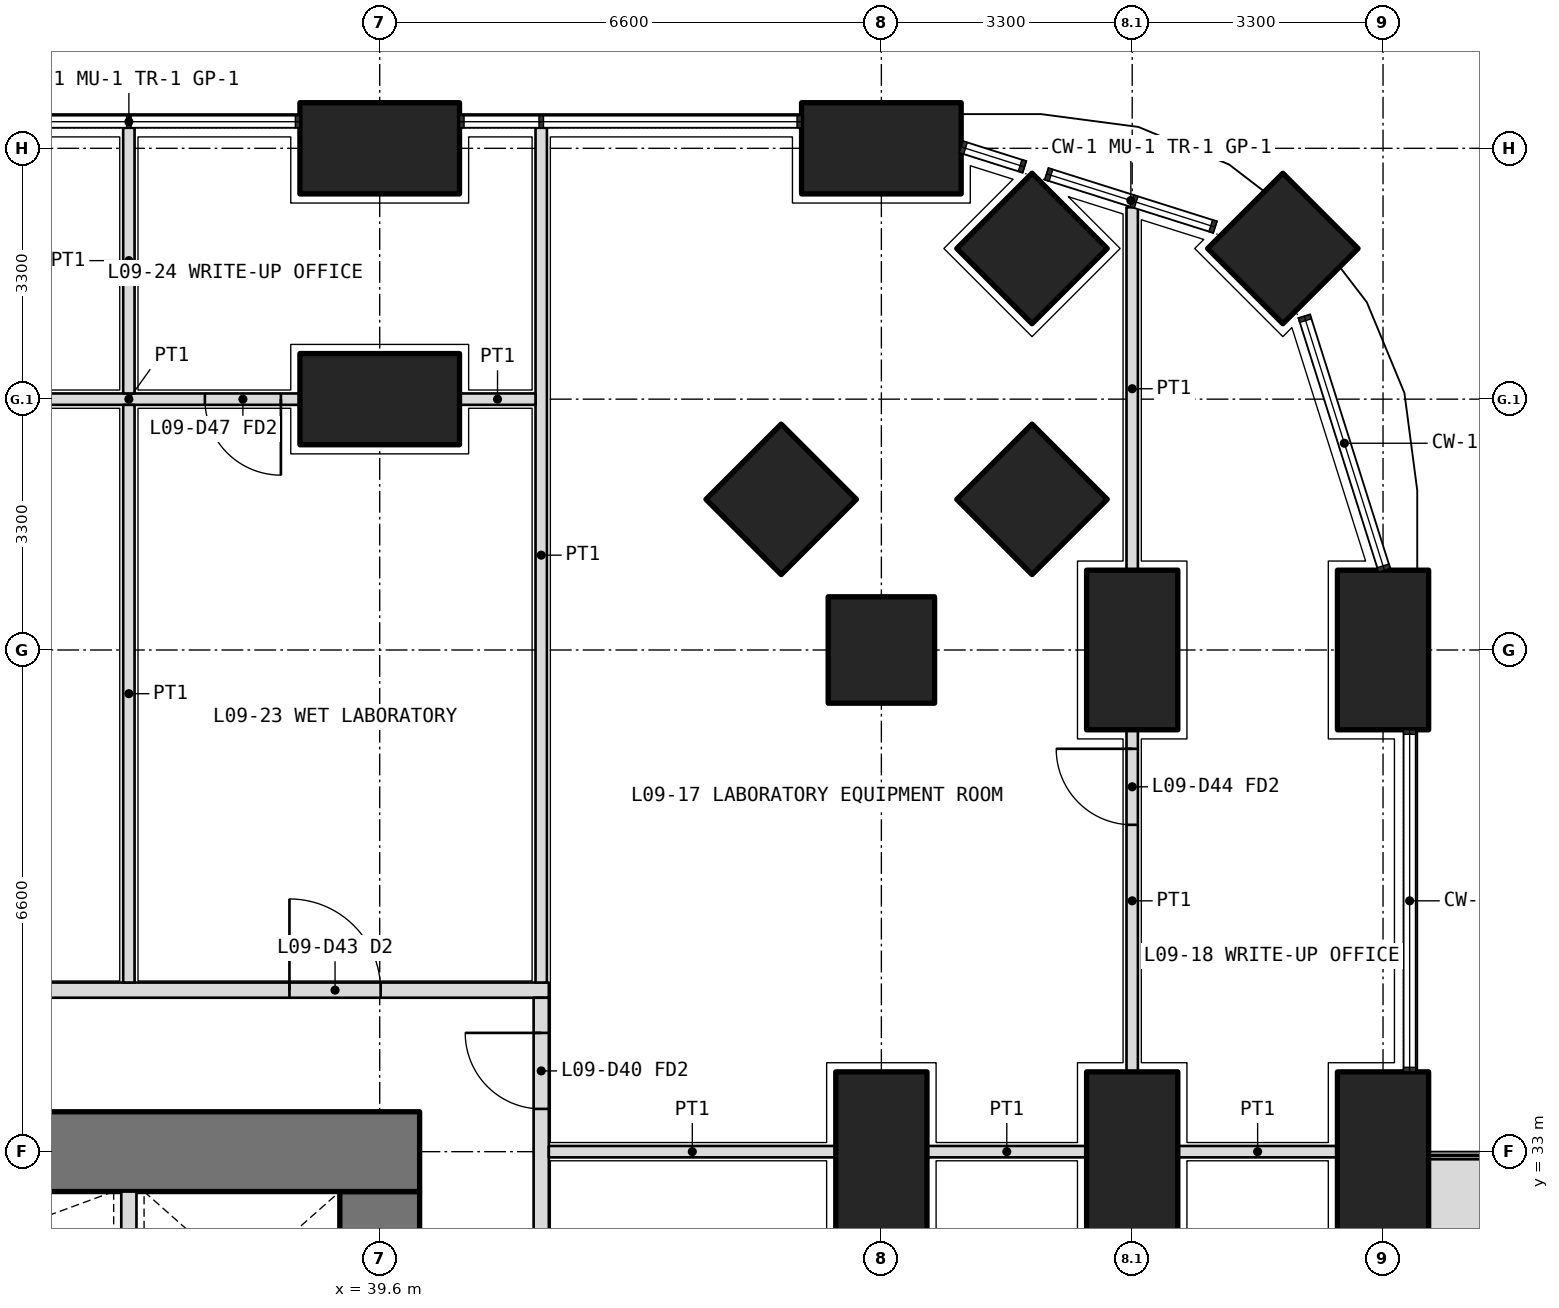
"""IFC4 building model, lengths in metres.
Left out: names, types, materials, properties, quantities, classifications, styles, units other than length and angle.
Written with IfcOpenShell. Run it as: python <this file> out.ifc"""

import sys

from ifc_helpers import new_model, si_unit, direction, frame, frame_2d, origin, origin_2d, place, context, subcontext, project, spatial, polyline, rectangle, outline, extrude, element, fill, save


model = new_model("IFC4")
c1 = context("Model", 3, precision=1e-05, world=origin(), true_north=direction((0.0, 1.0)))
c2 = subcontext(c1, "Body", "Model", "MODEL_VIEW")
j1 = project(units=[si_unit("LENGTHUNIT", "METRE"), si_unit("PLANEANGLEUNIT", "RADIAN")], contexts=[c1])
p1 = place(None, origin())
s1 = spatial("IfcSite", under=j1, at=p1, CompositionType="ELEMENT")
p2 = place(p1, origin())
s2 = spatial("IfcBuilding", under=s1, at=p2, CompositionType="ELEMENT")
p3 = place(p2, frame((0.0, 0.0, 42.3)))
s3 = spatial("IfcBuildingStorey", under=s2, at=p3, CompositionType="ELEMENT", Elevation=42.3)
p4 = place(p3, frame((51.482, 44.882, 0.0), z_axis=(0.0, 0.0, 1.0), x_axis=(0.707106781187, 0.707106781187, 0.0)))
e1 = element("IfcColumn", 1, at=p4, inside=s3, PredefinedType="COLUMN", context=c2, shape_type="SweptSolid", body=[
    extrude(rectangle(XDim=1.4, YDim=1.4, at=origin_2d()), origin(), (0.0, 0.0, 1.0), 4.2),
])
for number, where, z_axis, x_axis in (
    (2, (52.8, 33.0, 0.0), (0.0, 0.0, 1.0), (0.0, 1.0, 0.0)),
    (3, (52.8, 39.6, 0.0), (0.0, 0.0, 1.0), (0.0, 1.0, 0.0)),
    (4, (39.6, 46.2, 0.0), (0.0, 0.0, 1.0), (1.0, 0.0, 0.0)),
    (5, (46.2, 46.2, 0.0), (0.0, 0.0, 1.0), (1.0, 0.0, 0.0)),
):
    element("IfcColumn", number, at=place(p3, frame(where, z_axis=z_axis, x_axis=x_axis)), inside=s3, PredefinedType="COLUMN", context=c2, shape_type="SweptSolid", body=[
        extrude(rectangle(XDim=2.1, YDim=1.2, at=origin_2d()), origin(), (0.0, 0.0, 1.0), 4.2),
    ])
for number, where, z_axis, x_axis in (
    (6, (46.2, 39.6, 0.0), (0.0, 0.0, 1.0), (1.0, 0.0, 0.0)),
    (7, (48.182, 44.882, 0.0), (0.0, 0.0, 1.0), (0.707, 0.707, 0.0)),
):
    element("IfcColumn", number, at=place(p3, frame(where, z_axis=z_axis, x_axis=x_axis)), inside=s3, PredefinedType="COLUMN", context=c2, shape_type="SweptSolid", body=[
        extrude(rectangle(XDim=1.4, YDim=1.4, at=origin_2d()), origin(), (0.0, 0.0, 1.0), 4.2),
    ])
for number, where, z_axis, x_axis in (
    (8, (49.5, 33.0, 0.0), (0.0, 0.0, 1.0), (0.0, 1.0, 0.0)),
    (9, (49.5, 39.6, 0.0), (0.0, 0.0, 1.0), (0.0, 1.0, 0.0)),
):
    element("IfcColumn", number, at=place(p3, frame(where, z_axis=z_axis, x_axis=x_axis)), inside=s3, PredefinedType="COLUMN", context=c2, shape_type="SweptSolid", body=[
        extrude(rectangle(XDim=2.1, YDim=1.2, at=origin_2d()), origin(), (0.0, 0.0, 1.0), 4.2),
    ])
p5 = place(p3, frame((48.182, 41.582, 0.0), z_axis=(0.0, 0.0, 1.0), x_axis=(0.707106781187, 0.707106781187, 0.0)))
e10 = element("IfcColumn", 10, at=p5, inside=s3, PredefinedType="COLUMN", context=c2, shape_type="SweptSolid", body=[
    extrude(rectangle(XDim=1.4, YDim=1.4, at=origin_2d()), origin(), (0.0, 0.0, 1.0), 4.2),
])
p6 = place(p3, frame((39.6, 42.9, 0.0), z_axis=(0.0, 0.0, 1.0), x_axis=(1.0, 0.0, 0.0)))
e11 = element("IfcColumn", 11, at=p6, inside=s3, PredefinedType="COLUMN", context=c2, shape_type="SweptSolid", body=[
    extrude(rectangle(XDim=2.1, YDim=1.2, at=origin_2d()), origin(), (0.0, 0.0, 1.0), 4.2),
])
p7 = place(p3, frame((44.882, 41.582, 0.0), z_axis=(0.0, 0.0, 1.0), x_axis=(0.707106781187, 0.707106781187, 0.0)))
e12 = element("IfcColumn", 12, at=p7, inside=s3, PredefinedType="COLUMN", context=c2, shape_type="SweptSolid", body=[
    extrude(rectangle(XDim=1.4, YDim=1.4, at=origin_2d()), origin(), (0.0, 0.0, 1.0), 4.2),
])
p8 = place(p3, frame((46.2, 33.0, 0.0), z_axis=(0.0, 0.0, 1.0), x_axis=(0.0, 1.0, 0.0)))
e13 = element("IfcColumn", 13, at=p8, inside=s3, PredefinedType="COLUMN", context=c2, shape_type="SweptSolid", body=[
    extrude(rectangle(XDim=2.1, YDim=1.2, at=origin_2d()), origin(), (0.0, 0.0, 1.0), 4.2),
])
p9 = place(p3, origin())
e14 = element("IfcWall", 14, at=p9, inside=s3, PredefinedType="USERDEFINED", context=c2, shape_type="SweptSolid", body=[
    extrude(outline(polyline([(53.35, 23.85), (54.35, 23.85), (54.35, 32.9), (53.35, 32.9), (53.35, 23.85)]), holes=[polyline([(53.5, 24.0), (54.2, 24.0), (54.2, 32.75), (53.5, 32.75), (53.5, 24.0)])]), origin(), (0.0, 0.0, 1.0), 1.05),
])
p10 = place(p3, frame((39.6, 13.725, 0.0), z_axis=(0.0, 0.0, 1.0), x_axis=(0.0, 1.0, 0.0)))
e15 = element("IfcWall", 15, at=p10, inside=s3, PredefinedType="SHEAR", context=c2, shape_type="SweptSolid", body=[
    extrude(rectangle(XDim=18.75, YDim=1.05, at=frame_2d((9.375, 0.0))), origin(), (0.0, 0.0, 1.0), 4.2),
])
p11 = place(p10, frame((3.025, 0.0, 0.0)))
e16 = element("IfcOpeningElement", 16, at=p11, cuts=e15, PredefinedType="OPENING", context=c2, shape_type="SweptSolid", body=[
    extrude(rectangle(XDim=1.6, YDim=2.1, at=frame_2d((0.8, 1.05))), frame((0.0, 0.535, 0.0), z_axis=(0.0, -1.0, 0.0), x_axis=(1.0, 0.0, 0.0)), (0.0, 0.0, 1.0), 1.07),
])
p12 = place(p10, frame((13.825, 0.0, 0.0)))
e17 = element("IfcOpeningElement", 17, at=p12, cuts=e15, PredefinedType="OPENING", context=c2, shape_type="SweptSolid", body=[
    extrude(rectangle(XDim=1.6, YDim=2.1, at=frame_2d((0.8, 1.05))), frame((0.0, 0.535, 0.0), z_axis=(0.0, -1.0, 0.0), x_axis=(1.0, 0.0, 0.0)), (0.0, 0.0, 1.0), 1.07),
])
p13 = place(p3, frame((40.125, 33.0, 0.0), z_axis=(0.0, 0.0, 1.0), x_axis=(-1.0, 0.0, 0.0)))
e18 = element("IfcWall", 18, at=p13, inside=s3, PredefinedType="SHEAR", context=c2, shape_type="SweptSolid", body=[
    extrude(rectangle(XDim=27.45, YDim=1.05, at=frame_2d((13.725, 0.0))), origin(), (0.0, 0.0, 1.0), 4.2),
])
p14 = place(p3, frame((36.3, 30.2, 0.0), z_axis=(0.0, 0.0, 1.0), x_axis=(0.0, 1.0, 0.0)))
e19 = element("IfcWall", 19, at=p14, inside=s3, PredefinedType="PARTITIONING", context=c2, shape_type="SweptSolid", body=[
    extrude(rectangle(XDim=2.275, YDim=0.2, at=frame_2d((1.138, 0.0))), origin(), (0.0, 0.0, 1.0), 4.2),
])
p15 = place(p3, frame((10.975, 35.125, 0.0), z_axis=(0.0, 0.0, 1.0), x_axis=(1.0, 0.0, 0.0)))
e20 = element("IfcWall", 20, at=p15, inside=s3, PredefinedType="PARTITIONING", context=c2, shape_type="SweptSolid", body=[
    extrude(rectangle(XDim=30.85, YDim=0.2, at=frame_2d((15.425, 0.0))), origin(), (0.0, 0.0, 1.0), 2.85),
])
p16 = place(p15, frame((3.962, 0.0, 0.0)))
e21 = element("IfcOpeningElement", 21, at=p16, cuts=e20, PredefinedType="OPENING", context=c2, shape_type="SweptSolid", body=[
    extrude(rectangle(XDim=1.0, YDim=2.1, at=frame_2d((0.5, 1.05))), frame((0.0, 0.11, 0.0), z_axis=(0.0, -1.0, 0.0), x_axis=(1.0, 0.0, 0.0)), (0.0, 0.0, 1.0), 0.22),
])
p17 = place(p15, frame((16.475, 0.0, 0.0)))
e22 = element("IfcOpeningElement", 22, at=p17, cuts=e20, PredefinedType="OPENING", context=c2, shape_type="SweptSolid", body=[
    extrude(rectangle(XDim=1.2, YDim=2.1, at=frame_2d((0.6, 1.05))), frame((0.0, 0.11, 0.0), z_axis=(0.0, -1.0, 0.0), x_axis=(1.0, 0.0, 0.0)), (0.0, 0.0, 1.0), 0.22),
])
p18 = place(p15, frame((27.438, 0.0, 0.0)))
e23 = element("IfcOpeningElement", 23, at=p18, cuts=e20, PredefinedType="OPENING", context=c2, shape_type="SweptSolid", body=[
    extrude(rectangle(XDim=1.2, YDim=2.1, at=frame_2d((0.6, 1.05))), frame((0.0, 0.11, 0.0), z_axis=(0.0, -1.0, 0.0), x_axis=(1.0, 0.0, 0.0)), (0.0, 0.0, 1.0), 0.22),
])
p19 = place(p3, frame((41.725, 11.175, 0.0), z_axis=(0.0, 0.0, 1.0), x_axis=(0.0, 1.0, 0.0)))
e24 = element("IfcWall", 24, at=p19, inside=s3, PredefinedType="PARTITIONING", context=c2, shape_type="SweptSolid", body=[
    extrude(rectangle(XDim=23.85, YDim=0.2, at=frame_2d((11.925, 0.0))), origin(), (0.0, 0.0, 1.0), 2.85),
])
p20 = place(p19, frame((3.762, 0.0, 0.0)))
e25 = element("IfcOpeningElement", 25, at=p20, cuts=e24, PredefinedType="OPENING", context=c2, shape_type="SweptSolid", body=[
    extrude(rectangle(XDim=1.0, YDim=2.1, at=frame_2d((0.5, 1.05))), frame((0.0, 0.11, 0.0), z_axis=(0.0, -1.0, 0.0), x_axis=(1.0, 0.0, 0.0)), (0.0, 0.0, 1.0), 0.22),
])
p21 = place(p19, frame((9.725, 0.0, 0.0)))
e26 = element("IfcOpeningElement", 26, at=p21, cuts=e24, PredefinedType="OPENING", context=c2, shape_type="SweptSolid", body=[
    extrude(rectangle(XDim=1.0, YDim=2.1, at=frame_2d((0.5, 1.05))), frame((0.0, 0.11, 0.0), z_axis=(0.0, -1.0, 0.0), x_axis=(1.0, 0.0, 0.0)), (0.0, 0.0, 1.0), 0.22),
])
p22 = place(p19, frame((13.075, 0.0, 0.0)))
e27 = element("IfcOpeningElement", 27, at=p22, cuts=e24, PredefinedType="OPENING", context=c2, shape_type="SweptSolid", body=[
    extrude(rectangle(XDim=0.9, YDim=2.1, at=frame_2d((0.45, 1.05))), frame((0.0, 0.11, 0.0), z_axis=(0.0, -1.0, 0.0), x_axis=(1.0, 0.0, 0.0)), (0.0, 0.0, 1.0), 0.22),
])
p23 = place(p19, frame((17.925, 0.0, 0.0)))
e28 = element("IfcOpeningElement", 28, at=p23, cuts=e24, PredefinedType="OPENING", context=c2, shape_type="SweptSolid", body=[
    extrude(rectangle(XDim=1.2, YDim=2.1, at=frame_2d((0.6, 1.05))), frame((0.0, 0.11, 0.0), z_axis=(0.0, -1.0, 0.0), x_axis=(1.0, 0.0, 0.0)), (0.0, 0.0, 1.0), 0.22),
])
p24 = place(p19, frame((22.387, 0.0, 0.0)))
e29 = element("IfcOpeningElement", 29, at=p24, cuts=e24, PredefinedType="OPENING", context=c2, shape_type="SweptSolid", body=[
    extrude(rectangle(XDim=1.0, YDim=2.1, at=frame_2d((0.5, 1.05))), frame((0.0, 0.11, 0.0), z_axis=(0.0, -1.0, 0.0), x_axis=(1.0, 0.0, 0.0)), (0.0, 0.0, 1.0), 0.22),
])
p25 = place(p3, frame((41.725, 46.47, 0.0), z_axis=(0.0, 0.0, 1.0), x_axis=(0.0, -1.0, 0.0)))
e30 = element("IfcWall", 30, at=p25, inside=s3, PredefinedType="PARTITIONING", context=c2, shape_type="SweptSolid", body=[
    extrude(rectangle(XDim=11.245, YDim=0.15, at=frame_2d((5.623, 0.0))), origin(), (0.0, 0.0, 1.0), 2.7),
])
p26 = place(p3, frame((49.5, 34.05, 0.0), z_axis=(0.0, 0.0, 1.0), x_axis=(0.0, 1.0, 0.0)))
e31 = element("IfcWall", 31, at=p26, inside=s3, PredefinedType="PARTITIONING", context=c2, shape_type="SweptSolid", body=[
    extrude(rectangle(XDim=4.5, YDim=0.15, at=frame_2d((2.25, 0.0))), origin(), (0.0, 0.0, 1.0), 3.9),
])
p27 = place(p26, frame((3.25, 0.0, 0.0)))
e32 = element("IfcOpeningElement", 32, at=p27, cuts=e31, PredefinedType="OPENING", context=c2, shape_type="SweptSolid", body=[
    extrude(rectangle(XDim=1.0, YDim=2.1, at=frame_2d((0.5, 1.05))), frame((0.0, 0.085, 0.0), z_axis=(0.0, -1.0, 0.0), x_axis=(1.0, 0.0, 0.0)), (0.0, 0.0, 1.0), 0.17),
])
p28 = place(p3, frame((49.5, 40.65, 0.0), z_axis=(0.0, 0.0, 1.0), x_axis=(0.0, 1.0, 0.0)))
e33 = element("IfcWall", 33, at=p28, inside=s3, PredefinedType="PARTITIONING", context=c2, shape_type="SweptSolid", body=[
    extrude(rectangle(XDim=4.774, YDim=0.15, at=frame_2d((2.387, 0.0))), origin(), (0.0, 0.0, 1.0), 2.7),
])
for number, where, z_axis, x_axis in (
    (34, (52.2, 33.0, 0.0), (0.0, 0.0, 1.0), (-1.0, 0.0, 0.0)),
    (35, (48.9, 33.0, 0.0), (0.0, 0.0, 1.0), (-1.0, 0.0, 0.0)),
):
    element("IfcWall", number, at=place(p3, frame(where, z_axis=z_axis, x_axis=x_axis)), inside=s3, PredefinedType="PARTITIONING", context=c2, shape_type="SweptSolid", body=[
        extrude(rectangle(XDim=2.1, YDim=0.15, at=frame_2d((1.05, 0.0))), origin(), (0.0, 0.0, 1.0), 2.85),
    ])
p29 = place(p3, frame((45.6, 33.0, 0.0), z_axis=(0.0, 0.0, 1.0), x_axis=(-1.0, 0.0, 0.0)))
e36 = element("IfcWall", 36, at=p29, inside=s3, PredefinedType="PARTITIONING", context=c2, shape_type="SweptSolid", body=[
    extrude(rectangle(XDim=3.775, YDim=0.15, at=frame_2d((1.888, 0.0))), origin(), (0.0, 0.0, 1.0), 2.85),
])
p30 = place(p3, frame((41.65, 42.9, 0.0), z_axis=(0.0, 0.0, 1.0), x_axis=(-1.0, 0.0, 0.0)))
e37 = element("IfcWall", 37, at=p30, inside=s3, PredefinedType="PARTITIONING", context=c2, shape_type="SweptSolid", body=[
    extrude(rectangle(XDim=1.0, YDim=0.15, at=frame_2d((0.5, 0.0))), origin(), (0.0, 0.0, 1.0), 3.9),
])
p31 = place(p3, frame((38.55, 42.9, 0.0), z_axis=(0.0, 0.0, 1.0), x_axis=(-1.0, 0.0, 0.0)))
e38 = element("IfcWall", 38, at=p31, inside=s3, PredefinedType="PARTITIONING", context=c2, shape_type="SweptSolid", body=[
    extrude(rectangle(XDim=4.5, YDim=0.15, at=frame_2d((2.25, 0.0))), origin(), (0.0, 0.0, 1.0), 3.9),
])
p32 = place(p31, frame((0.25, 0.0, 0.0)))
e39 = element("IfcOpeningElement", 39, at=p32, cuts=e38, PredefinedType="OPENING", context=c2, shape_type="SweptSolid", body=[
    extrude(rectangle(XDim=1.0, YDim=2.1, at=frame_2d((0.5, 1.05))), frame((0.0, 0.085, 0.0), z_axis=(0.0, -1.0, 0.0), x_axis=(1.0, 0.0, 0.0)), (0.0, 0.0, 1.0), 0.17),
])
p33 = place(p3, frame((36.3, 46.47, 0.0), z_axis=(0.0, 0.0, 1.0), x_axis=(0.0, -1.0, 0.0)))
e40 = element("IfcWall", 40, at=p33, inside=s3, PredefinedType="PARTITIONING", context=c2, shape_type="SweptSolid", body=[
    extrude(rectangle(XDim=3.495, YDim=0.15, at=frame_2d((1.748, 0.0))), origin(), (0.0, 0.0, 1.0), 2.7),
])
p34 = place(p3, frame((36.3, 42.825, 0.0), z_axis=(0.0, 0.0, 1.0), x_axis=(0.0, -1.0, 0.0)))
e41 = element("IfcWall", 41, at=p34, inside=s3, PredefinedType="PARTITIONING", context=c2, shape_type="SweptSolid", body=[
    extrude(rectangle(XDim=7.6, YDim=0.15, at=frame_2d((3.8, 0.0))), origin(), (0.0, 0.0, 1.0), 3.9),
])
p35 = place(p24, origin())
e42 = element("IfcDoor", 42, at=p35, inside=s3, OperationType="SINGLE_SWING_RIGHT", PredefinedType="DOOR", context=c2, shape_type="SweptSolid", body=[
    extrude(rectangle(XDim=1.0, YDim=2.1, at=frame_2d((0.5, 1.05))), frame((0.0, 0.025, 0.0), z_axis=(0.0, -1.0, 0.0), x_axis=(1.0, 0.0, 0.0)), (0.0, 0.0, 1.0), 0.05),
])
fill(e29, e42)
p36 = place(p27, origin())
e43 = element("IfcDoor", 43, at=p36, inside=s3, OperationType="SINGLE_SWING_RIGHT", PredefinedType="DOOR", context=c2, shape_type="SweptSolid", body=[
    extrude(rectangle(XDim=1.0, YDim=2.1, at=frame_2d((0.5, 1.05))), frame((0.0, 0.025, 0.0), z_axis=(0.0, -1.0, 0.0), x_axis=(1.0, 0.0, 0.0)), (0.0, 0.0, 1.0), 0.05),
])
fill(e32, e43)
p37 = place(p18, origin())
e44 = element("IfcDoor", 44, at=p37, inside=s3, OperationType="DOUBLE_DOOR_SINGLE_SWING", PredefinedType="DOOR", context=c2, shape_type="SweptSolid", body=[
    extrude(rectangle(XDim=1.2, YDim=2.1, at=frame_2d((0.6, 1.05))), frame((0.0, 0.025, 0.0), z_axis=(0.0, -1.0, 0.0), x_axis=(1.0, 0.0, 0.0)), (0.0, 0.0, 1.0), 0.05),
])
fill(e23, e44)
p38 = place(p32, origin())
e45 = element("IfcDoor", 45, at=p38, inside=s3, OperationType="SINGLE_SWING_LEFT", PredefinedType="DOOR", context=c2, shape_type="SweptSolid", body=[
    extrude(rectangle(XDim=1.0, YDim=2.1, at=frame_2d((0.5, 1.05))), frame((0.0, 0.025, 0.0), z_axis=(0.0, -1.0, 0.0), x_axis=(1.0, 0.0, 0.0)), (0.0, 0.0, 1.0), 0.05),
])
fill(e39, e45)
save(model, sys.argv[1])
